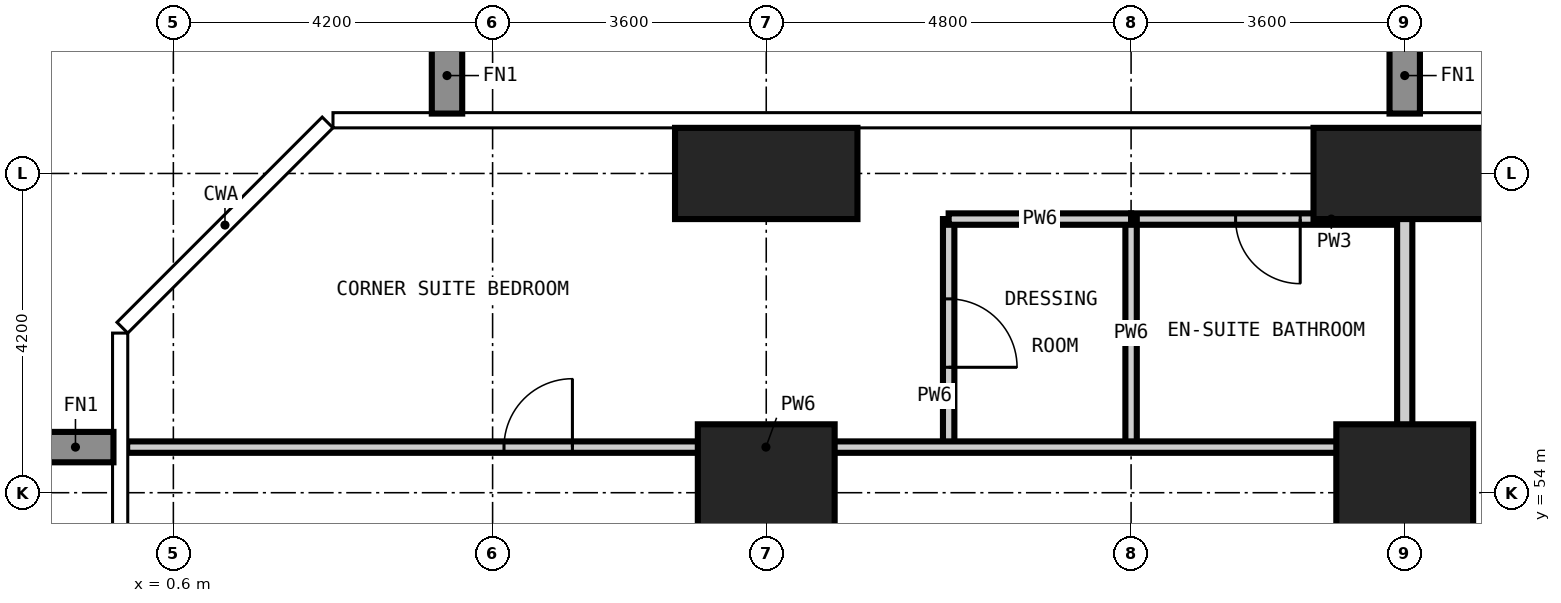
"""IFC4 building model, lengths in metres.
Left out: names, types, materials, properties, quantities, classifications, styles, units other than length and angle.
Written with IfcOpenShell. Run it as: python <this file> out.ifc"""

import sys

from ifc_helpers import new_model, si_unit, direction, frame, frame_2d, origin, origin_2d, place, context, subcontext, project, spatial, rectangle, extrude, element, fill, save


model = new_model("IFC4")
c1 = context("Model", 3, precision=1e-05, world=origin(), true_north=direction((0.0, 1.0)))
c2 = subcontext(c1, "Body", "Model", "MODEL_VIEW")
j1 = project(units=[si_unit("LENGTHUNIT", "METRE"), si_unit("PLANEANGLEUNIT", "RADIAN")], contexts=[c1])
p1 = place(None, origin())
s1 = spatial("IfcSite", under=j1, at=p1, CompositionType="ELEMENT")
p2 = place(p1, origin())
s2 = spatial("IfcBuilding", under=s1, at=p2, CompositionType="ELEMENT")
p3 = place(p2, frame((0.0, 0.0, 52.2)))
s3 = spatial("IfcBuildingStorey", under=s2, at=p3, CompositionType="ELEMENT", Elevation=52.2)
p4 = place(p3, frame((8.4, 54.0, -0.35), z_axis=(0.0, 0.0, 1.0), x_axis=(1.0, 0.0, 0.0)))
e1 = element("IfcColumn", 1, at=p4, inside=s3, PredefinedType="COLUMN", context=c2, shape_type="SweptSolid", body=[
    extrude(rectangle(XDim=1.8, YDim=1.8, at=origin_2d()), origin(), (0.0, 0.0, 1.0), 3.6),
])
p5 = place(p3, frame((8.4, 58.2, -0.35), z_axis=(0.0, 0.0, 1.0), x_axis=(1.0, 0.0, 0.0)))
e2 = element("IfcColumn", 2, at=p5, inside=s3, PredefinedType="COLUMN", context=c2, shape_type="SweptSolid", body=[
    extrude(rectangle(XDim=2.4, YDim=1.2, at=origin_2d()), origin(), (0.0, 0.0, 1.0), 3.6),
])
p6 = place(p3, frame((16.8, 54.0, -0.35), z_axis=(0.0, 0.0, 1.0), x_axis=(1.0, 0.0, 0.0)))
e3 = element("IfcColumn", 3, at=p6, inside=s3, PredefinedType="COLUMN", context=c2, shape_type="SweptSolid", body=[
    extrude(rectangle(XDim=1.8, YDim=1.8, at=origin_2d()), origin(), (0.0, 0.0, 1.0), 3.6),
])
p7 = place(p3, frame((16.8, 58.2, -0.35), z_axis=(0.0, 0.0, 1.0), x_axis=(1.0, 0.0, 0.0)))
e4 = element("IfcColumn", 4, at=p7, inside=s3, PredefinedType="COLUMN", context=c2, shape_type="SweptSolid", body=[
    extrude(rectangle(XDim=2.4, YDim=1.2, at=origin_2d()), origin(), (0.0, 0.0, 1.0), 3.6),
])
p8 = place(p3, frame((13.2, 57.6, 0.0), z_axis=(0.0, 0.0, 1.0), x_axis=(1.0, 0.0, 0.0)))
e5 = element("IfcWall", 5, at=p8, inside=s3, PredefinedType="PARTITIONING", context=c2, shape_type="SweptSolid", body=[
    extrude(rectangle(XDim=3.6, YDim=0.15, at=frame_2d((1.8, 0.0))), origin(), (0.0, 0.0, 1.0), 3.25),
])
p9 = place(p8, frame((1.375, 0.0, 0.0)))
e6 = element("IfcOpeningElement", 6, at=p9, cuts=e5, PredefinedType="OPENING", context=c2, shape_type="SweptSolid", body=[
    extrude(rectangle(XDim=0.85, YDim=2.1, at=frame_2d((0.425, 1.05))), frame((0.0, 0.085, 0.0), z_axis=(0.0, -1.0, 0.0), x_axis=(1.0, 0.0, 0.0)), (0.0, 0.0, 1.0), 0.17),
])
p10 = place(p3, frame((16.8, 45.55, 0.0), z_axis=(0.0, 0.0, 1.0), x_axis=(0.0, 1.0, 0.0)))
e7 = element("IfcWall", 7, at=p10, inside=s3, PredefinedType="PARTITIONING", context=c2, shape_type="SweptSolid", body=[
    extrude(rectangle(XDim=13.258, YDim=0.2, at=frame_2d((6.629, 0.0))), origin(), (0.0, 0.0, 1.0), 3.25),
])
p11 = place(p3, frame((10.8, 54.6, 0.0), z_axis=(0.0, 0.0, 1.0), x_axis=(0.0, 1.0, 0.0)))
e8 = element("IfcWall", 8, at=p11, inside=s3, PredefinedType="PARTITIONING", context=c2, shape_type="SweptSolid", body=[
    extrude(rectangle(XDim=3.0, YDim=0.15, at=frame_2d((1.5, 0.0))), origin(), (0.0, 0.0, 1.0), 3.25),
])
p12 = place(p11, frame((1.05, 0.0, 0.0)))
e9 = element("IfcOpeningElement", 9, at=p12, cuts=e8, PredefinedType="OPENING", context=c2, shape_type="SweptSolid", body=[
    extrude(rectangle(XDim=0.9, YDim=2.1, at=frame_2d((0.45, 1.05))), frame((0.0, 0.085, 0.0), z_axis=(0.0, -1.0, 0.0), x_axis=(1.0, 0.0, 0.0)), (0.0, 0.0, 1.0), 0.17),
])
p13 = place(p3, frame((13.2, 54.6, 0.0), z_axis=(0.0, 0.0, 1.0), x_axis=(0.0, 1.0, 0.0)))
e10 = element("IfcWall", 10, at=p13, inside=s3, PredefinedType="PARTITIONING", context=c2, shape_type="SweptSolid", body=[
    extrude(rectangle(XDim=3.0, YDim=0.15, at=frame_2d((1.5, 0.0))), origin(), (0.0, 0.0, 1.0), 3.25),
])
p14 = place(p3, frame((-0.008, 54.6, 0.0), z_axis=(0.0, 0.0, 1.0), x_axis=(1.0, 0.0, 0.0)))
e11 = element("IfcWall", 11, at=p14, inside=s3, PredefinedType="PARTITIONING", context=c2, shape_type="SweptSolid", body=[
    extrude(rectangle(XDim=16.808, YDim=0.15, at=frame_2d((8.404, 0.0))), origin(), (0.0, 0.0, 1.0), 3.25),
])
p15 = place(p14, frame((4.958, 0.0, 0.0)))
e12 = element("IfcOpeningElement", 12, at=p15, cuts=e11, PredefinedType="OPENING", context=c2, shape_type="SweptSolid", body=[
    extrude(rectangle(XDim=0.9, YDim=2.1, at=frame_2d((0.45, 1.05))), frame((0.0, 0.085, 0.0), z_axis=(0.0, -1.0, 0.0), x_axis=(1.0, 0.0, 0.0)), (0.0, 0.0, 1.0), 0.17),
])
p16 = place(p3, frame((10.8, 57.6, 0.0), z_axis=(0.0, 0.0, 1.0), x_axis=(1.0, 0.0, 0.0)))
e13 = element("IfcWall", 13, at=p16, inside=s3, PredefinedType="PARTITIONING", context=c2, shape_type="SweptSolid", body=[
    extrude(rectangle(XDim=2.4, YDim=0.15, at=frame_2d((1.2, 0.0))), origin(), (0.0, 0.0, 1.0), 3.25),
])
p17 = place(p15, origin())
e14 = element("IfcDoor", 14, at=p17, inside=s3, OperationType="SINGLE_SWING_RIGHT", PredefinedType="DOOR", context=c2, shape_type="SweptSolid", body=[
    extrude(rectangle(XDim=0.9, YDim=2.1, at=frame_2d((0.45, 1.05))), frame((0.0, 0.025, 0.0), z_axis=(0.0, -1.0, 0.0), x_axis=(1.0, 0.0, 0.0)), (0.0, 0.0, 1.0), 0.05),
])
fill(e12, e14)
p18 = place(p9, frame((0.85, 0.0, 0.0), z_axis=(0.0, 0.0, 1.0), x_axis=(-1.0, 0.0, 0.0)))
e15 = element("IfcDoor", 15, at=p18, inside=s3, OperationType="SINGLE_SWING_LEFT", PredefinedType="DOOR", context=c2, shape_type="SweptSolid", body=[
    extrude(rectangle(XDim=0.85, YDim=2.1, at=frame_2d((0.425, 1.05))), frame((0.0, 0.025, 0.0), z_axis=(0.0, -1.0, 0.0), x_axis=(1.0, 0.0, 0.0)), (0.0, 0.0, 1.0), 0.05),
])
fill(e6, e15)
p19 = place(p12, frame((0.9, 0.0, 0.0), z_axis=(0.0, 0.0, 1.0), x_axis=(-1.0, 0.0, 0.0)))
e16 = element("IfcDoor", 16, at=p19, inside=s3, OperationType="SINGLE_SWING_RIGHT", PredefinedType="DOOR", context=c2, shape_type="SweptSolid", body=[
    extrude(rectangle(XDim=0.9, YDim=2.1, at=frame_2d((0.45, 1.05))), frame((0.0, 0.025, 0.0), z_axis=(0.0, -1.0, 0.0), x_axis=(1.0, 0.0, 0.0)), (0.0, 0.0, 1.0), 0.05),
])
fill(e9, e16)
save(model, sys.argv[1])
